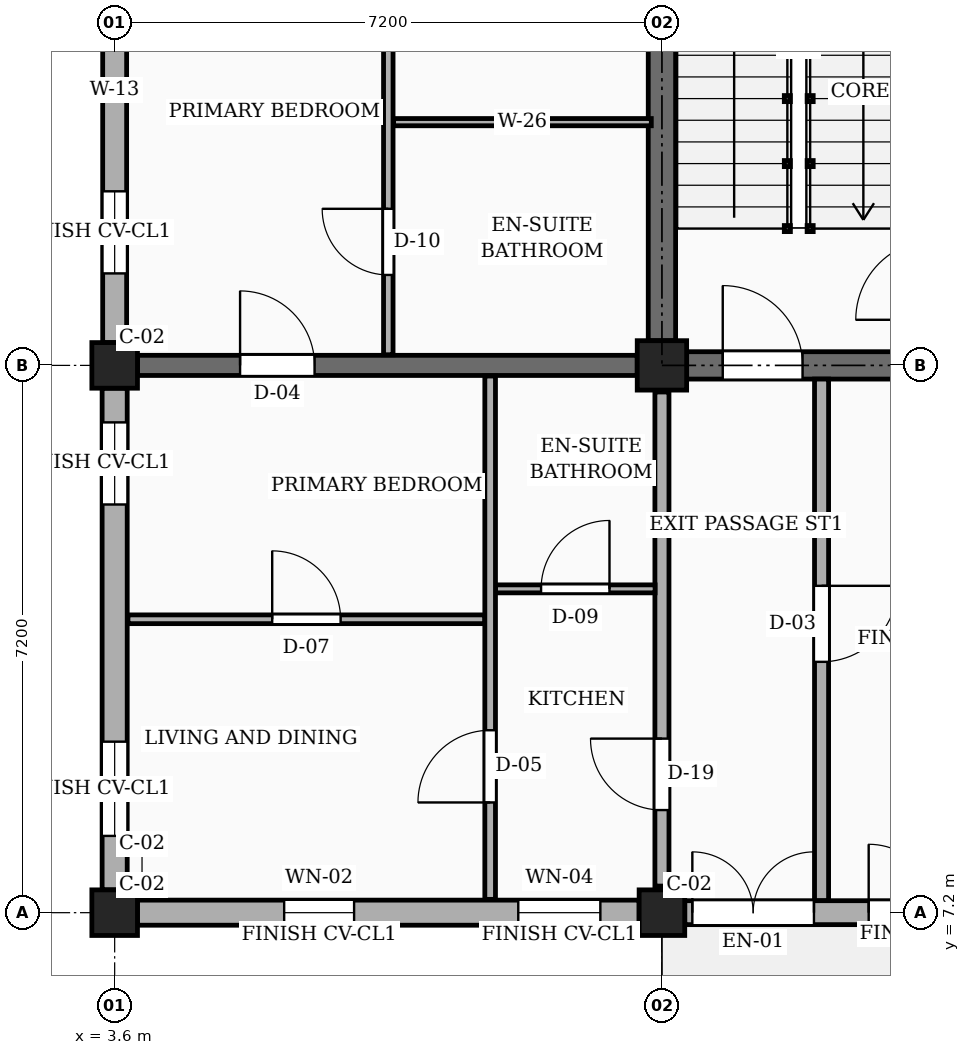
"""IFC4 building model, lengths in metres.
Left out: names, types, materials, properties, quantities, classifications, styles, units other than length and angle.
Written with IfcOpenShell. Run it as: python <this file> out.ifc"""

import sys

from ifc_helpers import new_model, si_unit, direction, frame, frame_2d, origin, origin_2d, place, context, subcontext, project, spatial, rectangle, extrude, element, fill, save


model = new_model("IFC4")
c1 = context("Model", 3, precision=1e-05, world=origin(), true_north=direction((0.0, 1.0)))
c2 = subcontext(c1, "Body", "Model", "MODEL_VIEW")
j1 = project(units=[si_unit("LENGTHUNIT", "METRE"), si_unit("PLANEANGLEUNIT", "RADIAN")], contexts=[c1])
p1 = place(None, origin())
s1 = spatial("IfcSite", under=j1, at=p1, CompositionType="ELEMENT")
p2 = place(p1, origin())
s2 = spatial("IfcBuilding", under=s1, at=p2, CompositionType="ELEMENT")
p3 = place(p2, origin())
s3 = spatial("IfcBuildingStorey", under=s2, at=p3, CompositionType="ELEMENT", Elevation=0.0)
for number, where, z_axis, x_axis in (
    (1, (3.6, 7.2, 0.0), (0.0, 0.0, 1.0), (1.0, 0.0, 0.0)),
    (2, (3.6, 14.4, 0.0), (0.0, 0.0, 1.0), (1.0, 0.0, 0.0)),
    (3, (10.8, 7.2, 0.0), (0.0, 0.0, 1.0), (1.0, 0.0, 0.0)),
):
    element("IfcColumn", number, at=place(p3, frame(where, z_axis=z_axis, x_axis=x_axis)), inside=s3, PredefinedType="COLUMN", context=c2, shape_type="SweptSolid", body=[
        extrude(rectangle(XDim=0.6, YDim=0.6, at=origin_2d()), origin(), (0.0, 0.0, 1.0), 4.5),
    ])
p4 = place(p3, frame((10.8, 14.4, 0.0), z_axis=(0.0, 0.0, 1.0), x_axis=(1.0, 0.0, 0.0)))
e4 = element("IfcColumn", 4, at=p4, inside=s3, PredefinedType="COLUMN", context=c2, shape_type="SweptSolid", body=[
    extrude(rectangle(XDim=0.65, YDim=0.65, at=origin_2d()), origin(), (0.0, 0.0, 1.0), 4.5),
])
p5 = place(p3, frame((3.9, 14.4, 0.0), z_axis=(0.0, 0.0, 1.0), x_axis=(1.0, 0.0, 0.0)))
e5 = element("IfcWall", 5, at=p5, inside=s3, PredefinedType="SOLIDWALL", context=c2, shape_type="SweptSolid", body=[
    extrude(rectangle(XDim=6.575, YDim=0.265, at=frame_2d((3.288, 0.0))), origin(), (0.0, 0.0, 1.0), 3.52),
])
p6 = place(p5, frame((1.35, 0.0, 0.0)))
e6 = element("IfcOpeningElement", 6, at=p6, cuts=e5, PredefinedType="OPENING", context=c2, shape_type="SweptSolid", body=[
    extrude(rectangle(XDim=0.98, YDim=2.12, at=frame_2d((0.49, 1.06))), frame((0.0, 0.143, 0.0), z_axis=(0.0, -1.0, 0.0), x_axis=(1.0, 0.0, 0.0)), (0.0, 0.0, 1.0), 0.285),
])
p7 = place(p3, frame((3.9, 7.2, 0.0), z_axis=(0.0, 0.0, 1.0), x_axis=(1.0, 0.0, 0.0)))
e7 = element("IfcWall", 7, at=p7, inside=s3, PredefinedType="SOLIDWALL", context=c2, shape_type="SweptSolid", body=[
    extrude(rectangle(XDim=6.6, YDim=0.33, at=frame_2d((3.3, 0.0))), origin(), (0.0, 0.0, 1.0), 3.79),
])
p8 = place(p7, frame((1.93, 0.0, 0.78)))
e8 = element("IfcOpeningElement", 8, at=p8, cuts=e7, PredefinedType="OPENING", context=c2, shape_type="SweptSolid", body=[
    extrude(rectangle(XDim=0.92, YDim=1.15, at=frame_2d((0.46, 0.575))), frame((0.0, 0.175, 0.0), z_axis=(0.0, -1.0, 0.0), x_axis=(1.0, 0.0, 0.0)), (0.0, 0.0, 1.0), 0.35),
])
p9 = place(p7, frame((5.01, 0.0, 0.78)))
e9 = element("IfcOpeningElement", 9, at=p9, cuts=e7, PredefinedType="OPENING", context=c2, shape_type="SweptSolid", body=[
    extrude(rectangle(XDim=1.08, YDim=1.15, at=frame_2d((0.54, 0.575))), frame((0.0, 0.175, 0.0), z_axis=(0.0, -1.0, 0.0), x_axis=(1.0, 0.0, 0.0)), (0.0, 0.0, 1.0), 0.35),
])
p10 = place(p3, frame((11.1, 7.2, 0.0), z_axis=(0.0, 0.0, 1.0), x_axis=(1.0, 0.0, 0.0)))
e10 = element("IfcWall", 10, at=p10, inside=s3, PredefinedType="SOLIDWALL", context=c2, shape_type="SweptSolid", body=[
    extrude(rectangle(XDim=6.64, YDim=0.315, at=frame_2d((3.32, 0.0))), origin(), (0.0, 0.0, 1.0), 3.79),
])
p11 = place(p10, frame((2.42, 0.0, 0.0)))
e11 = element("IfcOpeningElement", 11, at=p11, cuts=e10, PredefinedType="OPENING", context=c2, shape_type="SweptSolid", body=[
    extrude(rectangle(XDim=1.8, YDim=2.2, at=frame_2d((0.9, 1.1))), frame((0.0, 0.167, 0.0), z_axis=(0.0, -1.0, 0.0), x_axis=(1.0, 0.0, 0.0)), (0.0, 0.0, 1.0), 0.335),
])
p12 = place(p10, frame((0.1, 0.0, 0.0)))
e12 = element("IfcOpeningElement", 12, at=p12, cuts=e10, PredefinedType="OPENING", context=c2, shape_type="SweptSolid", body=[
    extrude(rectangle(XDim=1.6, YDim=2.25, at=frame_2d((0.8, 1.125))), frame((0.0, 0.167, 0.0), z_axis=(0.0, -1.0, 0.0), x_axis=(1.0, 0.0, 0.0)), (0.0, 0.0, 1.0), 0.335),
])
p13 = place(p3, frame((3.6, 21.34, 0.0), z_axis=(0.0, 0.0, 1.0), x_axis=(0.0, -1.0, 0.0)))
e13 = element("IfcWall", 13, at=p13, inside=s3, PredefinedType="SOLIDWALL", context=c2, shape_type="SweptSolid", body=[
    extrude(rectangle(XDim=6.64, YDim=0.315, at=frame_2d((3.32, 0.0))), origin(), (0.0, 0.0, 1.0), 3.79),
])
p14 = place(p13, frame((0.45, 0.0, 0.78)))
e14 = element("IfcOpeningElement", 14, at=p14, cuts=e13, PredefinedType="OPENING", context=c2, shape_type="SweptSolid", body=[
    extrude(rectangle(XDim=0.92, YDim=1.15, at=frame_2d((0.46, 0.575))), frame((0.0, 0.167, 0.0), z_axis=(0.0, -1.0, 0.0), x_axis=(1.0, 0.0, 0.0)), (0.0, 0.0, 1.0), 0.335),
])
p15 = place(p13, frame((4.65, 0.0, 0.78)))
e15 = element("IfcOpeningElement", 15, at=p15, cuts=e13, PredefinedType="OPENING", context=c2, shape_type="SweptSolid", body=[
    extrude(rectangle(XDim=1.08, YDim=1.15, at=frame_2d((0.54, 0.575))), frame((0.0, 0.167, 0.0), z_axis=(0.0, -1.0, 0.0), x_axis=(1.0, 0.0, 0.0)), (0.0, 0.0, 1.0), 0.335),
])
p16 = place(p3, frame((3.6, 14.1, 0.0), z_axis=(0.0, 0.0, 1.0), x_axis=(0.0, -1.0, 0.0)))
e16 = element("IfcWall", 16, at=p16, inside=s3, PredefinedType="SOLIDWALL", context=c2, shape_type="SweptSolid", body=[
    extrude(rectangle(XDim=6.6, YDim=0.33, at=frame_2d((3.3, 0.0))), origin(), (0.0, 0.0, 1.0), 3.79),
])
p17 = place(p16, frame((0.45, 0.0, 0.78)))
e17 = element("IfcOpeningElement", 17, at=p17, cuts=e16, PredefinedType="OPENING", context=c2, shape_type="SweptSolid", body=[
    extrude(rectangle(XDim=1.08, YDim=1.15, at=frame_2d((0.54, 0.575))), frame((0.0, 0.175, 0.0), z_axis=(0.0, -1.0, 0.0), x_axis=(1.0, 0.0, 0.0)), (0.0, 0.0, 1.0), 0.35),
])
p18 = place(p16, frame((4.65, 0.0, 0.78)))
e18 = element("IfcOpeningElement", 18, at=p18, cuts=e16, PredefinedType="OPENING", context=c2, shape_type="SweptSolid", body=[
    extrude(rectangle(XDim=1.24, YDim=1.15, at=frame_2d((0.62, 0.575))), frame((0.0, 0.175, 0.0), z_axis=(0.0, -1.0, 0.0), x_axis=(1.0, 0.0, 0.0)), (0.0, 0.0, 1.0), 0.35),
])
p19 = place(p3, frame((10.8, 14.725, 0.0), z_axis=(0.0, 0.0, 1.0), x_axis=(0.0, 1.0, 0.0)))
e19 = element("IfcWall", 19, at=p19, inside=s3, PredefinedType="SHEAR", context=c2, shape_type="SweptSolid", body=[
    extrude(rectangle(XDim=6.55, YDim=0.36, at=frame_2d((3.275, 0.0))), origin(), (0.0, 0.0, 1.0), 4.22),
])
p20 = place(p3, frame((11.125, 14.4, 0.0), z_axis=(0.0, 0.0, 1.0), x_axis=(1.0, 0.0, 0.0)))
e20 = element("IfcWall", 20, at=p20, inside=s3, PredefinedType="SHEAR", context=c2, shape_type="SweptSolid", body=[
    extrude(rectangle(XDim=6.55, YDim=0.36, at=frame_2d((3.275, 0.0))), origin(), (0.0, 0.0, 1.0), 4.22),
])
p21 = place(p20, frame((4.425, 0.0, 0.0)))
e21 = element("IfcOpeningElement", 21, at=p21, cuts=e20, PredefinedType="OPENING", context=c2, shape_type="SweptSolid", body=[
    extrude(rectangle(XDim=1.1, YDim=2.15, at=frame_2d((0.55, 1.075))), frame((0.0, 0.19, 0.0), z_axis=(0.0, -1.0, 0.0), x_axis=(1.0, 0.0, 0.0)), (0.0, 0.0, 1.0), 0.38),
])
p22 = place(p20, frame((0.475, 0.0, 0.0)))
e22 = element("IfcOpeningElement", 22, at=p22, cuts=e20, PredefinedType="OPENING", context=c2, shape_type="SweptSolid", body=[
    extrude(rectangle(XDim=1.05, YDim=2.15, at=frame_2d((0.525, 1.075))), frame((0.0, 0.19, 0.0), z_axis=(0.0, -1.0, 0.0), x_axis=(1.0, 0.0, 0.0)), (0.0, 0.0, 1.0), 0.38),
])
p23 = place(p3, frame((10.8, 7.55, 0.0), z_axis=(0.0, 0.0, 1.0), x_axis=(0.0, 1.0, 0.0)))
e23 = element("IfcWall", 23, at=p23, inside=s3, PredefinedType="PARTITIONING", context=c2, shape_type="SweptSolid", body=[
    extrude(rectangle(XDim=6.5, YDim=0.185, at=frame_2d((3.25, 0.0))), origin(), (0.0, 0.0, 1.0), 3.47),
])
p24 = place(p23, frame((1.0, 0.0, 0.0)))
e24 = element("IfcOpeningElement", 24, at=p24, cuts=e23, PredefinedType="OPENING", context=c2, shape_type="SweptSolid", body=[
    extrude(rectangle(XDim=0.94, YDim=2.12, at=frame_2d((0.47, 1.06))), frame((0.0, 0.103, 0.0), z_axis=(0.0, -1.0, 0.0), x_axis=(1.0, 0.0, 0.0)), (0.0, 0.0, 1.0), 0.205),
])
p25 = place(p3, frame((3.775, 11.06, 0.0), z_axis=(0.0, 0.0, 1.0), x_axis=(1.0, 0.0, 0.0)))
e25 = element("IfcWall", 25, at=p25, inside=s3, PredefinedType="PARTITIONING", context=c2, shape_type="SweptSolid", body=[
    extrude(rectangle(XDim=4.695, YDim=0.115, at=frame_2d((2.348, 0.0))), origin(), (0.0, 0.0, 1.0), 3.655),
])
p26 = place(p25, frame((1.897, 0.0, 0.0)))
e26 = element("IfcOpeningElement", 26, at=p26, cuts=e25, PredefinedType="OPENING", context=c2, shape_type="SweptSolid", body=[
    extrude(rectangle(XDim=0.9, YDim=2.1, at=frame_2d((0.45, 1.05))), frame((0.0, 0.067, 0.0), z_axis=(0.0, -1.0, 0.0), x_axis=(1.0, 0.0, 0.0)), (0.0, 0.0, 1.0), 0.135),
])
p27 = place(p3, frame((8.61, 11.46, 0.0), z_axis=(0.0, 0.0, 1.0), x_axis=(1.0, 0.0, 0.0)))
e27 = element("IfcWall", 27, at=p27, inside=s3, PredefinedType="PARTITIONING", context=c2, shape_type="SweptSolid", body=[
    extrude(rectangle(XDim=2.1, YDim=0.105, at=frame_2d((1.05, 0.0))), origin(), (0.0, 0.0, 1.0), 3.655),
])
p28 = place(p27, frame((0.6, 0.0, 0.0)))
e28 = element("IfcOpeningElement", 28, at=p28, cuts=e27, PredefinedType="OPENING", context=c2, shape_type="SweptSolid", body=[
    extrude(rectangle(XDim=0.9, YDim=2.05, at=frame_2d((0.45, 1.025))), frame((0.0, 0.062, 0.0), z_axis=(0.0, -1.0, 0.0), x_axis=(1.0, 0.0, 0.0)), (0.0, 0.0, 1.0), 0.125),
])
p29 = place(p3, frame((8.54, 7.375, 0.0), z_axis=(0.0, 0.0, 1.0), x_axis=(0.0, 1.0, 0.0)))
e29 = element("IfcWall", 29, at=p29, inside=s3, PredefinedType="PARTITIONING", context=c2, shape_type="SweptSolid", body=[
    extrude(rectangle(XDim=6.885, YDim=0.14, at=frame_2d((3.442, 0.0))), origin(), (0.0, 0.0, 1.0), 3.655),
])
p30 = place(p29, frame((1.275, 0.0, 0.0)))
e30 = element("IfcOpeningElement", 30, at=p30, cuts=e29, PredefinedType="OPENING", context=c2, shape_type="SweptSolid", body=[
    extrude(rectangle(XDim=0.95, YDim=2.1, at=frame_2d((0.475, 1.05))), frame((0.0, 0.08, 0.0), z_axis=(0.0, -1.0, 0.0), x_axis=(1.0, 0.0, 0.0)), (0.0, 0.0, 1.0), 0.16),
])
p31 = place(p3, frame((7.2, 14.54, 0.0), z_axis=(0.0, 0.0, 1.0), x_axis=(0.0, 1.0, 0.0)))
e31 = element("IfcWall", 31, at=p31, inside=s3, PredefinedType="PARTITIONING", context=c2, shape_type="SweptSolid", body=[
    extrude(rectangle(XDim=6.92, YDim=0.125, at=frame_2d((3.46, 0.0))), origin(), (0.0, 0.0, 1.0), 3.655),
])
p32 = place(p31, frame((1.05, 0.0, 0.0)))
e32 = element("IfcOpeningElement", 32, at=p32, cuts=e31, PredefinedType="OPENING", context=c2, shape_type="SweptSolid", body=[
    extrude(rectangle(XDim=0.87, YDim=2.05, at=frame_2d((0.435, 1.025))), frame((0.0, 0.073, 0.0), z_axis=(0.0, -1.0, 0.0), x_axis=(1.0, 0.0, 0.0)), (0.0, 0.0, 1.0), 0.145),
])
p33 = place(p31, frame((4.45, 0.0, 0.0)))
e33 = element("IfcOpeningElement", 33, at=p33, cuts=e31, PredefinedType="OPENING", context=c2, shape_type="SweptSolid", body=[
    extrude(rectangle(XDim=0.88, YDim=2.08, at=frame_2d((0.44, 1.04))), frame((0.0, 0.073, 0.0), z_axis=(0.0, -1.0, 0.0), x_axis=(1.0, 0.0, 0.0)), (0.0, 0.0, 1.0), 0.145),
])
p34 = place(p3, frame((7.27, 17.6, 0.0), z_axis=(0.0, 0.0, 1.0), x_axis=(1.0, 0.0, 0.0)))
e34 = element("IfcWall", 34, at=p34, inside=s3, PredefinedType="PARTITIONING", context=c2, shape_type="SweptSolid", body=[
    extrude(rectangle(XDim=3.39, YDim=0.095, at=frame_2d((1.695, 0.0))), origin(), (0.0, 0.0, 1.0), 3.655),
])
p35 = place(p3, frame((12.9, 14.22, 0.0), z_axis=(0.0, 0.0, 1.0), x_axis=(0.0, -1.0, 0.0)))
e35 = element("IfcWall", 35, at=p35, inside=s3, PredefinedType="PARTITIONING", context=c2, shape_type="SweptSolid", body=[
    extrude(rectangle(XDim=6.86, YDim=0.185, at=frame_2d((3.43, 0.0))), origin(), (0.0, 0.0, 1.0), 3.655),
])
p36 = place(p35, frame((2.72, 0.0, 0.0)))
e36 = element("IfcOpeningElement", 36, at=p36, cuts=e35, PredefinedType="OPENING", context=c2, shape_type="SweptSolid", body=[
    extrude(rectangle(XDim=1.0, YDim=2.15, at=frame_2d((0.5, 1.075))), frame((0.0, 0.103, 0.0), z_axis=(0.0, -1.0, 0.0), x_axis=(1.0, 0.0, 0.0)), (0.0, 0.0, 1.0), 0.205),
])
p37 = place(p8, origin())
e37 = element("IfcWindow", 37, at=p37, inside=s3, PartitioningType="SINGLE_PANEL", PredefinedType="WINDOW", context=c2, shape_type="SweptSolid", body=[
    extrude(rectangle(XDim=0.92, YDim=1.15, at=frame_2d((0.46, 0.575))), frame((0.0, 0.03, 0.0), z_axis=(0.0, -1.0, 0.0), x_axis=(1.0, 0.0, 0.0)), (0.0, 0.0, 1.0), 0.06),
])
fill(e8, e37)
p38 = place(p9, origin())
e38 = element("IfcWindow", 38, at=p38, inside=s3, PartitioningType="SINGLE_PANEL", PredefinedType="WINDOW", context=c2, shape_type="SweptSolid", body=[
    extrude(rectangle(XDim=1.08, YDim=1.15, at=frame_2d((0.54, 0.575))), frame((0.0, 0.03, 0.0), z_axis=(0.0, -1.0, 0.0), x_axis=(1.0, 0.0, 0.0)), (0.0, 0.0, 1.0), 0.06),
])
fill(e9, e38)
p39 = place(p11, frame((1.8, 0.0, 0.0), z_axis=(0.0, 0.0, 1.0), x_axis=(-1.0, 0.0, 0.0)))
e39 = element("IfcDoor", 39, at=p39, inside=s3, OperationType="DOUBLE_DOOR_SINGLE_SWING", PredefinedType="DOOR", context=c2, shape_type="SweptSolid", body=[
    extrude(rectangle(XDim=1.8, YDim=2.2, at=frame_2d((0.9, 1.1))), frame((0.0, 0.025, 0.0), z_axis=(0.0, -1.0, 0.0), x_axis=(1.0, 0.0, 0.0)), (0.0, 0.0, 1.0), 0.05),
])
fill(e11, e39)
p40 = place(p15, origin())
e40 = element("IfcWindow", 40, at=p40, inside=s3, PartitioningType="SINGLE_PANEL", PredefinedType="WINDOW", context=c2, shape_type="SweptSolid", body=[
    extrude(rectangle(XDim=1.08, YDim=1.15, at=frame_2d((0.54, 0.575))), frame((0.0, 0.03, 0.0), z_axis=(0.0, -1.0, 0.0), x_axis=(1.0, 0.0, 0.0)), (0.0, 0.0, 1.0), 0.06),
])
fill(e15, e40)
p41 = place(p17, origin())
e41 = element("IfcWindow", 41, at=p41, inside=s3, PartitioningType="SINGLE_PANEL", PredefinedType="WINDOW", context=c2, shape_type="SweptSolid", body=[
    extrude(rectangle(XDim=1.08, YDim=1.15, at=frame_2d((0.54, 0.575))), frame((0.0, 0.03, 0.0), z_axis=(0.0, -1.0, 0.0), x_axis=(1.0, 0.0, 0.0)), (0.0, 0.0, 1.0), 0.06),
])
fill(e17, e41)
p42 = place(p18, origin())
e42 = element("IfcWindow", 42, at=p42, inside=s3, PartitioningType="SINGLE_PANEL", PredefinedType="WINDOW", context=c2, shape_type="SweptSolid", body=[
    extrude(rectangle(XDim=1.24, YDim=1.15, at=frame_2d((0.62, 0.575))), frame((0.0, 0.03, 0.0), z_axis=(0.0, -1.0, 0.0), x_axis=(1.0, 0.0, 0.0)), (0.0, 0.0, 1.0), 0.06),
])
fill(e18, e42)
p43 = place(p24, origin())
e43 = element("IfcDoor", 43, at=p43, inside=s3, OperationType="SINGLE_SWING_RIGHT", PredefinedType="DOOR", context=c2, shape_type="SweptSolid", body=[
    extrude(rectangle(XDim=0.94, YDim=2.12, at=frame_2d((0.47, 1.06))), frame((0.0, 0.025, 0.0), z_axis=(0.0, -1.0, 0.0), x_axis=(1.0, 0.0, 0.0)), (0.0, 0.0, 1.0), 0.05),
])
fill(e24, e43)
p44 = place(p26, origin())
e44 = element("IfcDoor", 44, at=p44, inside=s3, OperationType="SINGLE_SWING_LEFT", PredefinedType="DOOR", context=c2, shape_type="SweptSolid", body=[
    extrude(rectangle(XDim=0.9, YDim=2.1, at=frame_2d((0.45, 1.05))), frame((0.0, 0.025, 0.0), z_axis=(0.0, -1.0, 0.0), x_axis=(1.0, 0.0, 0.0)), (0.0, 0.0, 1.0), 0.05),
])
fill(e26, e44)
p45 = place(p28, origin())
e45 = element("IfcDoor", 45, at=p45, inside=s3, OperationType="SINGLE_SWING_RIGHT", PredefinedType="DOOR", context=c2, shape_type="SweptSolid", body=[
    extrude(rectangle(XDim=0.9, YDim=2.05, at=frame_2d((0.45, 1.025))), frame((0.0, 0.025, 0.0), z_axis=(0.0, -1.0, 0.0), x_axis=(1.0, 0.0, 0.0)), (0.0, 0.0, 1.0), 0.05),
])
fill(e28, e45)
p46 = place(p30, origin())
e46 = element("IfcDoor", 46, at=p46, inside=s3, OperationType="SINGLE_SWING_LEFT", PredefinedType="DOOR", context=c2, shape_type="SweptSolid", body=[
    extrude(rectangle(XDim=0.95, YDim=2.1, at=frame_2d((0.475, 1.05))), frame((0.0, 0.025, 0.0), z_axis=(0.0, -1.0, 0.0), x_axis=(1.0, 0.0, 0.0)), (0.0, 0.0, 1.0), 0.05),
])
fill(e30, e46)
p47 = place(p32, origin())
e47 = element("IfcDoor", 47, at=p47, inside=s3, OperationType="SINGLE_SWING_RIGHT", PredefinedType="DOOR", context=c2, shape_type="SweptSolid", body=[
    extrude(rectangle(XDim=0.87, YDim=2.05, at=frame_2d((0.435, 1.025))), frame((0.0, 0.025, 0.0), z_axis=(0.0, -1.0, 0.0), x_axis=(1.0, 0.0, 0.0)), (0.0, 0.0, 1.0), 0.05),
])
fill(e32, e47)
p48 = place(p6, origin())
e48 = element("IfcDoor", 48, at=p48, inside=s3, OperationType="SINGLE_SWING_LEFT", PredefinedType="DOOR", context=c2, shape_type="SweptSolid", body=[
    extrude(rectangle(XDim=0.98, YDim=2.12, at=frame_2d((0.49, 1.06))), frame((0.0, 0.025, 0.0), z_axis=(0.0, -1.0, 0.0), x_axis=(1.0, 0.0, 0.0)), (0.0, 0.0, 1.0), 0.05),
])
fill(e6, e48)
p49 = place(p22, frame((1.05, 0.0, 0.0), z_axis=(0.0, 0.0, 1.0), x_axis=(-1.0, 0.0, 0.0)))
e49 = element("IfcDoor", 49, at=p49, inside=s3, OperationType="SINGLE_SWING_LEFT", PredefinedType="DOOR", context=c2, shape_type="SweptSolid", body=[
    extrude(rectangle(XDim=1.05, YDim=2.15, at=frame_2d((0.525, 1.075))), frame((0.0, 0.025, 0.0), z_axis=(0.0, -1.0, 0.0), x_axis=(1.0, 0.0, 0.0)), (0.0, 0.0, 1.0), 0.05),
])
fill(e22, e49)
p50 = place(p12, frame((1.6, 0.0, 0.0), z_axis=(0.0, 0.0, 1.0), x_axis=(-1.0, 0.0, 0.0)))
e50 = element("IfcDoor", 50, at=p50, inside=s3, OperationType="DOUBLE_DOOR_SINGLE_SWING", PredefinedType="DOOR", context=c2, shape_type="SweptSolid", body=[
    extrude(rectangle(XDim=1.6, YDim=2.25, at=frame_2d((0.8, 1.125))), frame((0.0, 0.025, 0.0), z_axis=(0.0, -1.0, 0.0), x_axis=(1.0, 0.0, 0.0)), (0.0, 0.0, 1.0), 0.05),
])
fill(e12, e50)
p51 = place(p36, origin())
e51 = element("IfcDoor", 51, at=p51, inside=s3, OperationType="SINGLE_SWING_LEFT", PredefinedType="DOOR", context=c2, shape_type="SweptSolid", body=[
    extrude(rectangle(XDim=1.0, YDim=2.15, at=frame_2d((0.5, 1.075))), frame((0.0, 0.025, 0.0), z_axis=(0.0, -1.0, 0.0), x_axis=(1.0, 0.0, 0.0)), (0.0, 0.0, 1.0), 0.05),
])
fill(e36, e51)
save(model, sys.argv[1])
